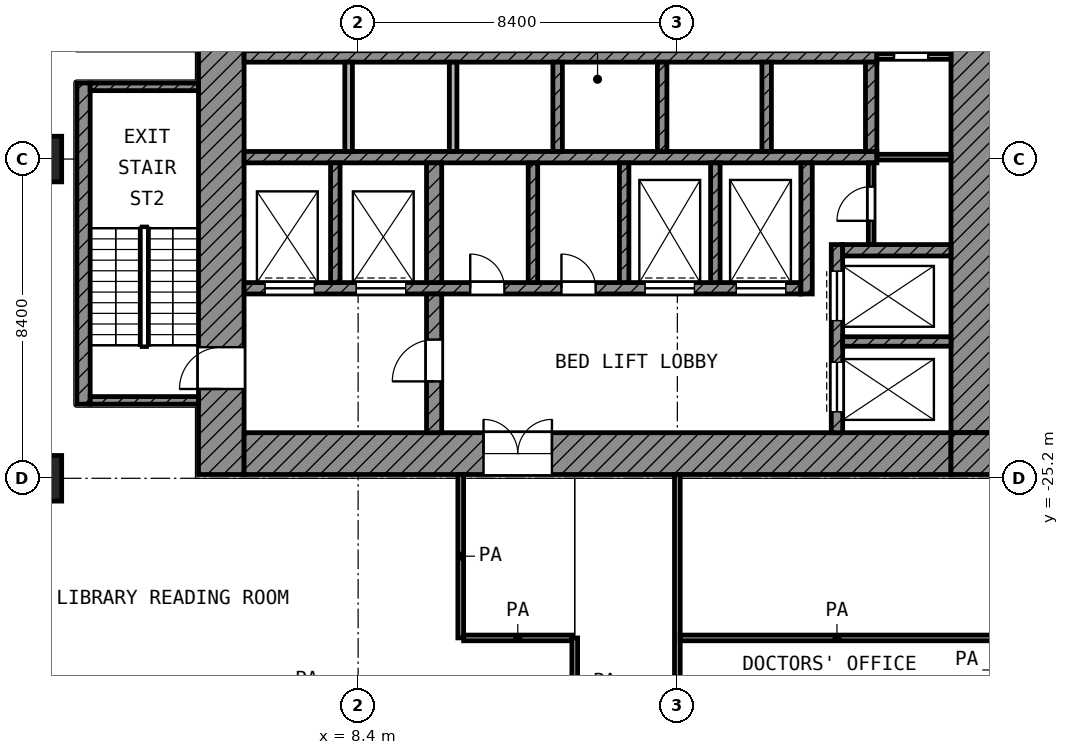
"""IFC4 building model, lengths in metres.
Left out: names, types, materials, properties, quantities, classifications, styles, units other than length and angle.
Written with IfcOpenShell. Run it as: python <this file> out.ifc"""

import sys

from ifc_helpers import new_model, si_unit, direction, frame, frame_2d, origin, origin_2d, place, context, subcontext, project, spatial, rectangle, extrude, element, fill, save


model = new_model("IFC4")
c1 = context("Model", 3, precision=1e-05, world=origin(), true_north=direction((0.0, 1.0)))
c2 = subcontext(c1, "Body", "Model", "MODEL_VIEW")
j1 = project(units=[si_unit("LENGTHUNIT", "METRE"), si_unit("PLANEANGLEUNIT", "RADIAN")], contexts=[c1])
p1 = place(None, origin())
s1 = spatial("IfcSite", under=j1, at=p1, CompositionType="ELEMENT")
p2 = place(p1, origin())
s2 = spatial("IfcBuilding", under=s1, at=p2, CompositionType="ELEMENT")
p3 = place(p2, frame((0.0, 0.0, 47.6)))
s3 = spatial("IfcBuildingStorey", under=s2, at=p3, CompositionType="ELEMENT", Elevation=47.6)
for number, where, z_axis, x_axis in (
    (1, (0.0, -16.8, 0.0), (0.0, 0.0, 1.0), (1.0, 0.0, 0.0)),
    (2, (0.0, -25.2, 0.0), (0.0, 0.0, 1.0), (1.0, 0.0, 0.0)),
):
    element("IfcColumn", number, at=place(p3, frame(where, z_axis=z_axis, x_axis=x_axis)), inside=s3, PredefinedType="COLUMN", context=c2, shape_type="SweptSolid", body=[
        extrude(rectangle(XDim=1.2, YDim=1.2, at=origin_2d()), origin(), (0.0, 0.0, 1.0), 4.2),
    ])
p4 = place(p3, frame((4.8, -25.1, 0.0), z_axis=(0.0, 0.0, 1.0), x_axis=(0.0, 1.0, 0.0)))
e3 = element("IfcWall", 3, at=p4, inside=s3, PredefinedType="SHEAR", context=c2, shape_type="SweptSolid", body=[
    extrude(rectangle(XDim=19.7, YDim=1.2, at=frame_2d((9.85, 0.0))), origin(), (0.0, 0.0, 1.0), 3.78),
])
p5 = place(p4, frame((11.55, 0.0, 0.0)))
e4 = element("IfcOpeningElement", 4, at=p5, cuts=e3, PredefinedType="OPENING", context=c2, shape_type="SweptSolid", body=[
    extrude(rectangle(XDim=1.1, YDim=2.1, at=frame_2d((0.55, 1.05))), frame((0.0, 0.61, 0.0), z_axis=(0.0, -1.0, 0.0), x_axis=(1.0, 0.0, 0.0)), (0.0, 0.0, 1.0), 1.22),
])
p6 = place(p4, frame((2.25, 0.0, 0.0)))
e5 = element("IfcOpeningElement", 5, at=p6, cuts=e3, PredefinedType="OPENING", context=c2, shape_type="SweptSolid", body=[
    extrude(rectangle(XDim=1.1, YDim=2.1, at=frame_2d((0.55, 1.05))), frame((0.0, 0.61, 0.0), z_axis=(0.0, -1.0, 0.0), x_axis=(1.0, 0.0, 0.0)), (0.0, 0.0, 1.0), 1.22),
])
p7 = place(p3, frame((24.55, -24.0, 0.0), z_axis=(0.0, 0.0, 1.0), x_axis=(0.0, 1.0, 0.0)))
e6 = element("IfcWall", 6, at=p7, inside=s3, PredefinedType="SHEAR", context=c2, shape_type="SweptSolid", body=[
    extrude(rectangle(XDim=18.6, YDim=1.1, at=frame_2d((9.3, 0.0))), origin(), (0.0, 0.0, 1.0), 3.78),
])
p8 = place(p7, frame((10.5, 0.0, 0.0)))
e7 = element("IfcOpeningElement", 7, at=p8, cuts=e6, PredefinedType="OPENING", context=c2, shape_type="SweptSolid", body=[
    extrude(rectangle(XDim=1.8, YDim=2.1, at=frame_2d((0.9, 1.05))), frame((0.0, 0.56, 0.0), z_axis=(0.0, -1.0, 0.0), x_axis=(1.0, 0.0, 0.0)), (0.0, 0.0, 1.0), 1.12),
])
p9 = place(p3, frame((5.4, -24.55, 0.0), z_axis=(0.0, 0.0, 1.0), x_axis=(1.0, 0.0, 0.0)))
e8 = element("IfcWall", 8, at=p9, inside=s3, PredefinedType="SHEAR", context=c2, shape_type="SweptSolid", body=[
    extrude(rectangle(XDim=18.6, YDim=1.1, at=frame_2d((9.3, 0.0))), origin(), (0.0, 0.0, 1.0), 3.78),
])
p10 = place(p9, frame((6.3, 0.0, 0.0)))
e9 = element("IfcOpeningElement", 9, at=p10, cuts=e8, PredefinedType="OPENING", context=c2, shape_type="SweptSolid", body=[
    extrude(rectangle(XDim=1.8, YDim=2.1, at=frame_2d((0.9, 1.05))), frame((0.0, 0.56, 0.0), z_axis=(0.0, -1.0, 0.0), x_axis=(1.0, 0.0, 0.0)), (0.0, 0.0, 1.0), 1.12),
])
p11 = place(p3, frame((24.55, -25.1, 0.0), z_axis=(0.0, 0.0, 1.0), x_axis=(0.0, 1.0, 0.0)))
e10 = element("IfcWall", 10, at=p11, inside=s3, PredefinedType="SHEAR", context=c2, shape_type="SweptSolid", body=[
    extrude(rectangle(XDim=1.1, YDim=1.1, at=frame_2d((0.55, 0.0))), origin(), (0.0, 0.0, 1.0), 3.78),
])
for number, where, z_axis, x_axis in (
    (11, (5.4, -14.1, 0.0), (0.0, 0.0, 1.0), (1.0, 0.0, 0.0)),
    (12, (5.4, -16.75, 0.0), (0.0, 0.0, 1.0), (1.0, 0.0, 0.0)),
):
    element("IfcWall", number, at=place(p3, frame(where, z_axis=z_axis, x_axis=x_axis)), inside=s3, PredefinedType="SHEAR", context=c2, shape_type="SweptSolid", body=[
        extrude(rectangle(XDim=16.65, YDim=0.3, at=frame_2d((8.325, 0.0))), origin(), (0.0, 0.0, 1.0), 3.78),
    ])
p12 = place(p3, frame((5.4, -20.2, 0.0), z_axis=(0.0, 0.0, 1.0), x_axis=(1.0, 0.0, 0.0)))
e13 = element("IfcWall", 13, at=p12, inside=s3, PredefinedType="SHEAR", context=c2, shape_type="SweptSolid", body=[
    extrude(rectangle(XDim=14.65, YDim=0.3, at=frame_2d((7.325, 0.0))), origin(), (0.0, 0.0, 1.0), 3.78),
])
p13 = place(p12, frame((10.55, 0.0, 0.0)))
e14 = element("IfcOpeningElement", 14, at=p13, cuts=e13, PredefinedType="OPENING", context=c2, shape_type="SweptSolid", body=[
    extrude(rectangle(XDim=1.3, YDim=2.1, at=frame_2d((0.65, 1.05))), frame((0.0, 0.16, 0.0), z_axis=(0.0, -1.0, 0.0), x_axis=(1.0, 0.0, 0.0)), (0.0, 0.0, 1.0), 0.32),
])
p14 = place(p12, frame((12.95, 0.0, 0.0)))
e15 = element("IfcOpeningElement", 15, at=p14, cuts=e13, PredefinedType="OPENING", context=c2, shape_type="SweptSolid", body=[
    extrude(rectangle(XDim=1.3, YDim=2.1, at=frame_2d((0.65, 1.05))), frame((0.0, 0.16, 0.0), z_axis=(0.0, -1.0, 0.0), x_axis=(1.0, 0.0, 0.0)), (0.0, 0.0, 1.0), 0.32),
])
p15 = place(p12, frame((0.55, 0.0, 0.0)))
e16 = element("IfcOpeningElement", 16, at=p15, cuts=e13, PredefinedType="OPENING", context=c2, shape_type="SweptSolid", body=[
    extrude(rectangle(XDim=1.3, YDim=2.1, at=frame_2d((0.65, 1.05))), frame((0.0, 0.16, 0.0), z_axis=(0.0, -1.0, 0.0), x_axis=(1.0, 0.0, 0.0)), (0.0, 0.0, 1.0), 0.32),
])
p16 = place(p12, frame((2.95, 0.0, 0.0)))
e17 = element("IfcOpeningElement", 17, at=p16, cuts=e13, PredefinedType="OPENING", context=c2, shape_type="SweptSolid", body=[
    extrude(rectangle(XDim=1.3, YDim=2.1, at=frame_2d((0.65, 1.05))), frame((0.0, 0.16, 0.0), z_axis=(0.0, -1.0, 0.0), x_axis=(1.0, 0.0, 0.0)), (0.0, 0.0, 1.0), 0.32),
])
p17 = place(p12, frame((5.95, 0.0, 0.0)))
e18 = element("IfcOpeningElement", 18, at=p17, cuts=e13, PredefinedType="OPENING", context=c2, shape_type="SweptSolid", body=[
    extrude(rectangle(XDim=0.9, YDim=2.1, at=frame_2d((0.45, 1.05))), frame((0.0, 0.16, 0.0), z_axis=(0.0, -1.0, 0.0), x_axis=(1.0, 0.0, 0.0)), (0.0, 0.0, 1.0), 0.32),
])
p18 = place(p12, frame((8.35, 0.0, 0.0)))
e19 = element("IfcOpeningElement", 19, at=p18, cuts=e13, PredefinedType="OPENING", context=c2, shape_type="SweptSolid", body=[
    extrude(rectangle(XDim=0.9, YDim=2.1, at=frame_2d((0.45, 1.05))), frame((0.0, 0.16, 0.0), z_axis=(0.0, -1.0, 0.0), x_axis=(1.0, 0.0, 0.0)), (0.0, 0.0, 1.0), 0.32),
])
p19 = place(p3, frame((10.4, -24.0, 0.0), z_axis=(0.0, 0.0, 1.0), x_axis=(0.0, 1.0, 0.0)))
e20 = element("IfcWall", 20, at=p19, inside=s3, PredefinedType="SHEAR", context=c2, shape_type="SweptSolid", body=[
    extrude(rectangle(XDim=3.65, YDim=0.4, at=frame_2d((1.825, 0.0))), origin(), (0.0, 0.0, 1.0), 3.78),
])
p20 = place(p19, frame((1.35, 0.0, 0.0)))
e21 = element("IfcOpeningElement", 21, at=p20, cuts=e20, PredefinedType="OPENING", context=c2, shape_type="SweptSolid", body=[
    extrude(rectangle(XDim=1.1, YDim=2.1, at=frame_2d((0.55, 1.05))), frame((0.0, 0.21, 0.0), z_axis=(0.0, -1.0, 0.0), x_axis=(1.0, 0.0, 0.0)), (0.0, 0.0, 1.0), 0.42),
])
p21 = place(p3, frame((10.4, -20.05, 0.0), z_axis=(0.0, 0.0, 1.0), x_axis=(0.0, 1.0, 0.0)))
e22 = element("IfcWall", 22, at=p21, inside=s3, PredefinedType="SHEAR", context=c2, shape_type="SweptSolid", body=[
    extrude(rectangle(XDim=3.15, YDim=0.4, at=frame_2d((1.575, 0.0))), origin(), (0.0, 0.0, 1.0), 3.78),
])
p22 = place(p3, frame((20.2, -20.35, 0.0), z_axis=(0.0, 0.0, 1.0), x_axis=(0.0, 1.0, 0.0)))
e23 = element("IfcWall", 23, at=p22, inside=s3, PredefinedType="SHEAR", context=c2, shape_type="SweptSolid", body=[
    extrude(rectangle(XDim=3.45, YDim=0.3, at=frame_2d((1.725, 0.0))), origin(), (0.0, 0.0, 1.0), 3.78),
])
p23 = place(p3, frame((21.9, -16.6, 0.0), z_axis=(0.0, 0.0, 1.0), x_axis=(0.0, 1.0, 0.0)))
e24 = element("IfcWall", 24, at=p23, inside=s3, PredefinedType="SHEAR", context=c2, shape_type="SweptSolid", body=[
    extrude(rectangle(XDim=2.35, YDim=0.3, at=frame_2d((1.175, 0.0))), origin(), (0.0, 0.0, 1.0), 3.78),
])
p24 = place(p3, frame((21.15, -19.2, 0.0), z_axis=(0.0, 0.0, 1.0), x_axis=(1.0, 0.0, 0.0)))
e25 = element("IfcWall", 25, at=p24, inside=s3, PredefinedType="SHEAR", context=c2, shape_type="SweptSolid", body=[
    extrude(rectangle(XDim=2.85, YDim=0.3, at=frame_2d((1.425, 0.0))), origin(), (0.0, 0.0, 1.0), 3.78),
])
p25 = place(p3, frame((21.0, -24.0, 0.0), z_axis=(0.0, 0.0, 1.0), x_axis=(0.0, 1.0, 0.0)))
e26 = element("IfcWall", 26, at=p25, inside=s3, PredefinedType="SHEAR", context=c2, shape_type="SweptSolid", body=[
    extrude(rectangle(XDim=4.95, YDim=0.3, at=frame_2d((2.475, 0.0))), origin(), (0.0, 0.0, 1.0), 3.78),
])
p26 = place(p25, frame((2.95, 0.0, 0.0)))
e27 = element("IfcOpeningElement", 27, at=p26, cuts=e26, PredefinedType="OPENING", context=c2, shape_type="SweptSolid", body=[
    extrude(rectangle(XDim=1.3, YDim=2.1, at=frame_2d((0.65, 1.05))), frame((0.0, 0.16, 0.0), z_axis=(0.0, -1.0, 0.0), x_axis=(1.0, 0.0, 0.0)), (0.0, 0.0, 1.0), 0.32),
])
p27 = place(p25, frame((0.55, 0.0, 0.0)))
e28 = element("IfcOpeningElement", 28, at=p27, cuts=e26, PredefinedType="OPENING", context=c2, shape_type="SweptSolid", body=[
    extrude(rectangle(XDim=1.3, YDim=2.1, at=frame_2d((0.65, 1.05))), frame((0.0, 0.16, 0.0), z_axis=(0.0, -1.0, 0.0), x_axis=(1.0, 0.0, 0.0)), (0.0, 0.0, 1.0), 0.32),
])
p28 = place(p3, frame((21.15, -21.6, 0.0), z_axis=(0.0, 0.0, 1.0), x_axis=(1.0, 0.0, 0.0)))
e29 = element("IfcWall", 29, at=p28, inside=s3, PredefinedType="SHEAR", context=c2, shape_type="SweptSolid", body=[
    extrude(rectangle(XDim=2.85, YDim=0.25, at=frame_2d((1.425, 0.0))), origin(), (0.0, 0.0, 1.0), 3.78),
])
for number, where, z_axis, x_axis in (
    (30, (7.8, -20.05, 0.0), (0.0, 0.0, 1.0), (0.0, 1.0, 0.0)),
    (31, (13.0, -20.05, 0.0), (0.0, 0.0, 1.0), (0.0, 1.0, 0.0)),
    (32, (15.4, -20.05, 0.0), (0.0, 0.0, 1.0), (0.0, 1.0, 0.0)),
    (33, (17.8, -20.05, 0.0), (0.0, 0.0, 1.0), (0.0, 1.0, 0.0)),
):
    element("IfcWall", number, at=place(p3, frame(where, z_axis=z_axis, x_axis=x_axis)), inside=s3, PredefinedType="SHEAR", context=c2, shape_type="SweptSolid", body=[
        extrude(rectangle(XDim=3.15, YDim=0.25, at=frame_2d((1.575, 0.0))), origin(), (0.0, 0.0, 1.0), 3.78),
    ])
for number, where, z_axis, x_axis in (
    (34, (8.15, -16.6, 0.0), (0.0, 0.0, 1.0), (0.0, 1.0, 0.0)),
    (35, (10.9, -16.6, 0.0), (0.0, 0.0, 1.0), (0.0, 1.0, 0.0)),
):
    element("IfcWall", number, at=place(p3, frame(where, z_axis=z_axis, x_axis=x_axis)), inside=s3, PredefinedType="PARTITIONING", context=c2, shape_type="SweptSolid", body=[
        extrude(rectangle(XDim=2.35, YDim=0.2, at=frame_2d((1.175, 0.0))), origin(), (0.0, 0.0, 1.0), 3.78),
    ])
for number, where, z_axis, x_axis in (
    (36, (13.65, -16.6, 0.0), (0.0, 0.0, 1.0), (0.0, 1.0, 0.0)),
    (37, (16.4, -16.6, 0.0), (0.0, 0.0, 1.0), (0.0, 1.0, 0.0)),
    (38, (19.15, -16.6, 0.0), (0.0, 0.0, 1.0), (0.0, 1.0, 0.0)),
):
    element("IfcWall", number, at=place(p3, frame(where, z_axis=z_axis, x_axis=x_axis)), inside=s3, PredefinedType="SHEAR", context=c2, shape_type="SweptSolid", body=[
        extrude(rectangle(XDim=2.35, YDim=0.25, at=frame_2d((1.175, 0.0))), origin(), (0.0, 0.0, 1.0), 3.78),
    ])
p29 = place(p3, frame((21.9, -19.05, 0.0), z_axis=(0.0, 0.0, 1.0), x_axis=(0.0, 1.0, 0.0)))
e39 = element("IfcWall", 39, at=p29, inside=s3, PredefinedType="PARTITIONING", context=c2, shape_type="SweptSolid", body=[
    extrude(rectangle(XDim=2.15, YDim=0.15, at=frame_2d((1.075, 0.0))), origin(), (0.0, 0.0, 1.0), 3.78),
])
p30 = place(p29, frame((0.625, 0.0, 0.0)))
e40 = element("IfcOpeningElement", 40, at=p30, cuts=e39, PredefinedType="OPENING", context=c2, shape_type="SweptSolid", body=[
    extrude(rectangle(XDim=0.9, YDim=2.1, at=frame_2d((0.45, 1.05))), frame((0.0, 0.085, 0.0), z_axis=(0.0, -1.0, 0.0), x_axis=(1.0, 0.0, 0.0)), (0.0, 0.0, 1.0), 0.17),
])
p31 = place(p3, frame((22.05, -16.75, 0.0), z_axis=(0.0, 0.0, 1.0), x_axis=(1.0, 0.0, 0.0)))
e41 = element("IfcWall", 41, at=p31, inside=s3, PredefinedType="PARTITIONING", context=c2, shape_type="SweptSolid", body=[
    extrude(rectangle(XDim=1.95, YDim=0.15, at=frame_2d((0.975, 0.0))), origin(), (0.0, 0.0, 1.0), 3.78),
])
p32 = place(p3, frame((22.05, -14.1, 0.0), z_axis=(0.0, 0.0, 1.0), x_axis=(1.0, 0.0, 0.0)))
e42 = element("IfcWall", 42, at=p32, inside=s3, PredefinedType="PARTITIONING", context=c2, shape_type="SweptSolid", body=[
    extrude(rectangle(XDim=1.95, YDim=0.15, at=frame_2d((0.975, 0.0))), origin(), (0.0, 0.0, 1.0), 3.78),
])
p33 = place(p32, frame((0.45, 0.0, 0.0)))
e43 = element("IfcOpeningElement", 43, at=p33, cuts=e42, PredefinedType="OPENING", context=c2, shape_type="SweptSolid", body=[
    extrude(rectangle(XDim=0.9, YDim=2.1, at=frame_2d((0.45, 1.05))), frame((0.0, 0.085, 0.0), z_axis=(0.0, -1.0, 0.0), x_axis=(1.0, 0.0, 0.0)), (0.0, 0.0, 1.0), 0.17),
])
p34 = place(p3, frame((1.175, -23.25, 0.0), z_axis=(0.0, 0.0, 1.0), x_axis=(0.0, 1.0, 0.0)))
e44 = element("IfcWall", 44, at=p34, inside=s3, PredefinedType="SHEAR", context=c2, shape_type="SweptSolid", body=[
    extrude(rectangle(XDim=8.45, YDim=0.35, at=frame_2d((4.225, 0.0))), origin(), (0.0, 0.0, 1.0), 3.78),
])
for number, where, z_axis, x_axis in (
    (45, (1.35, -14.9, 0.0), (0.0, 0.0, 1.0), (1.0, 0.0, 0.0)),
    (46, (1.35, -23.15, 0.0), (0.0, 0.0, 1.0), (1.0, 0.0, 0.0)),
):
    element("IfcWall", number, at=place(p3, frame(where, z_axis=z_axis, x_axis=x_axis)), inside=s3, PredefinedType="SHEAR", context=c2, shape_type="SweptSolid", body=[
        extrude(rectangle(XDim=2.85, YDim=0.2, at=frame_2d((1.425, 0.0))), origin(), (0.0, 0.0, 1.0), 3.78),
    ])
p35 = place(p3, frame((11.177, -29.4, 0.0), z_axis=(0.0, 0.0, 1.0), x_axis=(1.0, 0.0, 0.0)))
e47 = element("IfcWall", 47, at=p35, inside=s3, PredefinedType="PARTITIONING", context=c2, shape_type="SweptSolid", body=[
    extrude(rectangle(XDim=2.848, YDim=0.15, at=frame_2d((1.424, 0.0))), origin(), (0.0, 0.0, 1.0), 3.78),
])
p36 = place(p3, frame((16.875, -29.4, 0.0), z_axis=(0.0, 0.0, 1.0), x_axis=(1.0, 0.0, 0.0)))
e48 = element("IfcWall", 48, at=p36, inside=s3, PredefinedType="PARTITIONING", context=c2, shape_type="SweptSolid", body=[
    extrude(rectangle(XDim=8.25, YDim=0.15, at=frame_2d((4.125, 0.0))), origin(), (0.0, 0.0, 1.0), 3.78),
])
p37 = place(p3, frame((11.1, -29.399, 0.0), z_axis=(0.0, 0.0, 1.0), x_axis=(0.0, 1.0, 0.0)))
e49 = element("IfcWall", 49, at=p37, inside=s3, PredefinedType="PARTITIONING", context=c2, shape_type="SweptSolid", body=[
    extrude(rectangle(XDim=4.299, YDim=0.15, at=frame_2d((2.149, 0.0))), origin(), (0.0, 0.0, 1.0), 3.78),
])
p38 = place(p3, frame((14.1, -31.707, 0.0), z_axis=(0.0, 0.0, 1.0), x_axis=(0.0, 1.0, 0.0)))
e50 = element("IfcWall", 50, at=p38, inside=s3, PredefinedType="PARTITIONING", context=c2, shape_type="SweptSolid", body=[
    extrude(rectangle(XDim=2.307, YDim=0.15, at=frame_2d((1.154, 0.0))), origin(), (0.0, 0.0, 1.0), 3.78),
])
p39 = place(p3, frame((16.8, -41.35, 0.0), z_axis=(0.0, 0.0, 1.0), x_axis=(0.0, 1.0, 0.0)))
e51 = element("IfcWall", 51, at=p39, inside=s3, PredefinedType="PARTITIONING", context=c2, shape_type="SweptSolid", body=[
    extrude(rectangle(XDim=16.25, YDim=0.15, at=frame_2d((8.125, 0.0))), origin(), (0.0, 0.0, 1.0), 3.78),
])
p40 = place(p39, frame((9.35, 0.0, 0.0)))
e52 = element("IfcOpeningElement", 52, at=p40, cuts=e51, PredefinedType="OPENING", context=c2, shape_type="SweptSolid", body=[
    extrude(rectangle(XDim=1.0, YDim=2.1, at=frame_2d((0.5, 1.05))), frame((0.0, 0.085, 0.0), z_axis=(0.0, -1.0, 0.0), x_axis=(1.0, 0.0, 0.0)), (0.0, 0.0, 1.0), 0.17),
])
p41 = place(p39, frame((5.0, 0.0, 0.0)))
e53 = element("IfcOpeningElement", 53, at=p41, cuts=e51, PredefinedType="OPENING", context=c2, shape_type="SweptSolid", body=[
    extrude(rectangle(XDim=1.0, YDim=2.1, at=frame_2d((0.5, 1.05))), frame((0.0, 0.085, 0.0), z_axis=(0.0, -1.0, 0.0), x_axis=(1.0, 0.0, 0.0)), (0.0, 0.0, 1.0), 0.17),
])
p42 = place(p39, frame((1.175, 0.0, 0.0)))
e54 = element("IfcOpeningElement", 54, at=p42, cuts=e51, PredefinedType="OPENING", context=c2, shape_type="SweptSolid", body=[
    extrude(rectangle(XDim=0.9, YDim=2.1, at=frame_2d((0.45, 1.05))), frame((0.0, 0.085, 0.0), z_axis=(0.0, -1.0, 0.0), x_axis=(1.0, 0.0, 0.0)), (0.0, 0.0, 1.0), 0.17),
])
p43 = place(p26, origin())
e55 = element("IfcDoor", 55, at=p43, inside=s3, OperationType="DOUBLE_DOOR_SLIDING", PredefinedType="DOOR", context=c2, shape_type="SweptSolid", body=[
    extrude(rectangle(XDim=1.3, YDim=2.1, at=frame_2d((0.65, 1.05))), frame((0.0, 0.025, 0.0), z_axis=(0.0, -1.0, 0.0), x_axis=(1.0, 0.0, 0.0)), (0.0, 0.0, 1.0), 0.05),
])
fill(e27, e55)
p44 = place(p27, origin())
e56 = element("IfcDoor", 56, at=p44, inside=s3, OperationType="DOUBLE_DOOR_SLIDING", PredefinedType="DOOR", context=c2, shape_type="SweptSolid", body=[
    extrude(rectangle(XDim=1.3, YDim=2.1, at=frame_2d((0.65, 1.05))), frame((0.0, 0.025, 0.0), z_axis=(0.0, -1.0, 0.0), x_axis=(1.0, 0.0, 0.0)), (0.0, 0.0, 1.0), 0.05),
])
fill(e28, e56)
p45 = place(p13, origin())
e57 = element("IfcDoor", 57, at=p45, inside=s3, OperationType="DOUBLE_DOOR_SLIDING", PredefinedType="DOOR", context=c2, shape_type="SweptSolid", body=[
    extrude(rectangle(XDim=1.3, YDim=2.1, at=frame_2d((0.65, 1.05))), frame((0.0, 0.025, 0.0), z_axis=(0.0, -1.0, 0.0), x_axis=(1.0, 0.0, 0.0)), (0.0, 0.0, 1.0), 0.05),
])
fill(e14, e57)
p46 = place(p14, origin())
e58 = element("IfcDoor", 58, at=p46, inside=s3, OperationType="DOUBLE_DOOR_SLIDING", PredefinedType="DOOR", context=c2, shape_type="SweptSolid", body=[
    extrude(rectangle(XDim=1.3, YDim=2.1, at=frame_2d((0.65, 1.05))), frame((0.0, 0.025, 0.0), z_axis=(0.0, -1.0, 0.0), x_axis=(1.0, 0.0, 0.0)), (0.0, 0.0, 1.0), 0.05),
])
fill(e15, e58)
p47 = place(p15, origin())
e59 = element("IfcDoor", 59, at=p47, inside=s3, OperationType="DOUBLE_DOOR_SLIDING", PredefinedType="DOOR", context=c2, shape_type="SweptSolid", body=[
    extrude(rectangle(XDim=1.3, YDim=2.1, at=frame_2d((0.65, 1.05))), frame((0.0, 0.025, 0.0), z_axis=(0.0, -1.0, 0.0), x_axis=(1.0, 0.0, 0.0)), (0.0, 0.0, 1.0), 0.05),
])
fill(e16, e59)
p48 = place(p16, origin())
e60 = element("IfcDoor", 60, at=p48, inside=s3, OperationType="DOUBLE_DOOR_SLIDING", PredefinedType="DOOR", context=c2, shape_type="SweptSolid", body=[
    extrude(rectangle(XDim=1.3, YDim=2.1, at=frame_2d((0.65, 1.05))), frame((0.0, 0.025, 0.0), z_axis=(0.0, -1.0, 0.0), x_axis=(1.0, 0.0, 0.0)), (0.0, 0.0, 1.0), 0.05),
])
fill(e17, e60)
p49 = place(p6, origin())
e61 = element("IfcDoor", 61, at=p49, inside=s3, OperationType="SINGLE_SWING_LEFT", PredefinedType="DOOR", context=c2, shape_type="SweptSolid", body=[
    extrude(rectangle(XDim=1.1, YDim=2.1, at=frame_2d((0.55, 1.05))), frame((0.0, 0.025, 0.0), z_axis=(0.0, -1.0, 0.0), x_axis=(1.0, 0.0, 0.0)), (0.0, 0.0, 1.0), 0.05),
])
fill(e5, e61)
p50 = place(p20, origin())
e62 = element("IfcDoor", 62, at=p50, inside=s3, OperationType="SINGLE_SWING_LEFT", PredefinedType="DOOR", context=c2, shape_type="SweptSolid", body=[
    extrude(rectangle(XDim=1.1, YDim=2.1, at=frame_2d((0.55, 1.05))), frame((0.0, 0.025, 0.0), z_axis=(0.0, -1.0, 0.0), x_axis=(1.0, 0.0, 0.0)), (0.0, 0.0, 1.0), 0.05),
])
fill(e21, e62)
p51 = place(p10, origin())
e63 = element("IfcDoor", 63, at=p51, inside=s3, OperationType="DOUBLE_DOOR_SINGLE_SWING", PredefinedType="DOOR", context=c2, shape_type="SweptSolid", body=[
    extrude(rectangle(XDim=1.8, YDim=2.1, at=frame_2d((0.9, 1.05))), frame((0.0, 0.025, 0.0), z_axis=(0.0, -1.0, 0.0), x_axis=(1.0, 0.0, 0.0)), (0.0, 0.0, 1.0), 0.05),
])
fill(e9, e63)
p52 = place(p33, origin())
e64 = element("IfcDoor", 64, at=p52, inside=s3, OperationType="SINGLE_SWING_LEFT", PredefinedType="DOOR", context=c2, shape_type="SweptSolid", body=[
    extrude(rectangle(XDim=0.9, YDim=2.1, at=frame_2d((0.45, 1.05))), frame((0.0, 0.025, 0.0), z_axis=(0.0, -1.0, 0.0), x_axis=(1.0, 0.0, 0.0)), (0.0, 0.0, 1.0), 0.05),
])
fill(e43, e64)
p53 = place(p30, origin())
e65 = element("IfcDoor", 65, at=p53, inside=s3, OperationType="SINGLE_SWING_LEFT", PredefinedType="DOOR", context=c2, shape_type="SweptSolid", body=[
    extrude(rectangle(XDim=0.9, YDim=2.1, at=frame_2d((0.45, 1.05))), frame((0.0, 0.025, 0.0), z_axis=(0.0, -1.0, 0.0), x_axis=(1.0, 0.0, 0.0)), (0.0, 0.0, 1.0), 0.05),
])
fill(e40, e65)
p54 = place(p17, origin())
e66 = element("IfcDoor", 66, at=p54, inside=s3, OperationType="SINGLE_SWING_LEFT", PredefinedType="DOOR", context=c2, shape_type="SweptSolid", body=[
    extrude(rectangle(XDim=0.9, YDim=2.1, at=frame_2d((0.45, 1.05))), frame((0.0, 0.025, 0.0), z_axis=(0.0, -1.0, 0.0), x_axis=(1.0, 0.0, 0.0)), (0.0, 0.0, 1.0), 0.05),
])
fill(e18, e66)
p55 = place(p18, origin())
e67 = element("IfcDoor", 67, at=p55, inside=s3, OperationType="SINGLE_SWING_LEFT", PredefinedType="DOOR", context=c2, shape_type="SweptSolid", body=[
    extrude(rectangle(XDim=0.9, YDim=2.1, at=frame_2d((0.45, 1.05))), frame((0.0, 0.025, 0.0), z_axis=(0.0, -1.0, 0.0), x_axis=(1.0, 0.0, 0.0)), (0.0, 0.0, 1.0), 0.05),
])
fill(e19, e67)
save(model, sys.argv[1])
